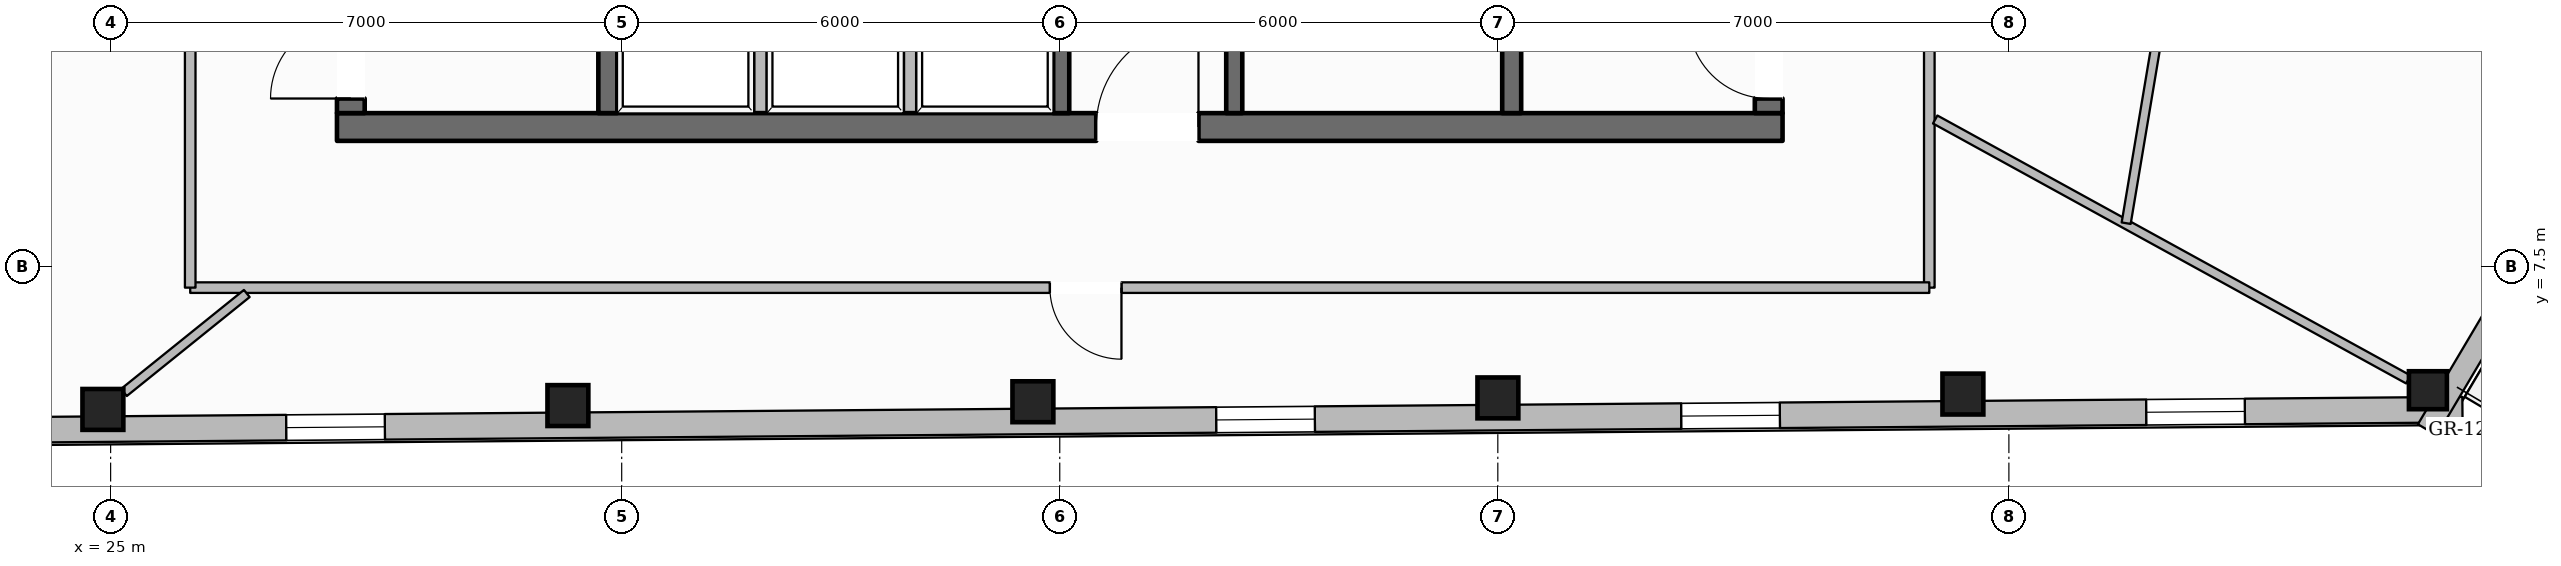
"""IFC4 building model, lengths in metres.
Left out: names, types, materials, properties, quantities, classifications, styles, units other than length and angle.
Written with IfcOpenShell. Run it as: python <this file> out.ifc"""

import sys

from ifc_helpers import new_model, si_unit, direction, frame, frame_2d, origin, origin_2d, place, context, subcontext, project, spatial, rectangle, hollow_rectangle, extrude, element, fill, save


model = new_model("IFC4")
c1 = context("Model", 3, precision=1e-05, world=origin(), true_north=direction((0.0, 1.0)))
c2 = subcontext(c1, "Body", "Model", "MODEL_VIEW")
j1 = project(units=[si_unit("LENGTHUNIT", "METRE"), si_unit("PLANEANGLEUNIT", "RADIAN")], contexts=[c1])
p1 = place(None, origin())
s1 = spatial("IfcSite", under=j1, at=p1, CompositionType="ELEMENT")
p2 = place(p1, origin())
s2 = spatial("IfcBuilding", under=s1, at=p2, CompositionType="ELEMENT")
p3 = place(p2, frame((0.0, 0.0, 281.85)))
s3 = spatial("IfcBuildingStorey", under=s2, at=p3, CompositionType="ELEMENT", Elevation=281.85)
p4 = place(p3, frame((28.1, 9.41, 0.0), z_axis=(0.0, 0.0, 1.0), x_axis=(1.0, 0.0, 0.0)))
e1 = element("IfcWall", 1, at=p4, inside=s3, PredefinedType="SOLIDWALL", context=c2, shape_type="SweptSolid", body=[
    extrude(rectangle(XDim=19.8, YDim=0.38, at=frame_2d((9.9, 0.0))), origin(), (0.0, 0.0, 1.0), 3.61),
])
p5 = place(p4, frame((10.4, 0.0, 0.0)))
e2 = element("IfcOpeningElement", 2, at=p5, cuts=e1, PredefinedType="OPENING", context=c2, shape_type="SweptSolid", body=[
    extrude(rectangle(XDim=1.4, YDim=2.2, at=frame_2d((0.7, 1.1))), frame((0.0, 0.2, 0.0), z_axis=(0.0, -1.0, 0.0), x_axis=(1.0, 0.0, 0.0)), (0.0, 0.0, 1.0), 0.4),
])
p6 = place(p3, frame((28.29, 9.6, 0.0), z_axis=(0.0, 0.0, 1.0), x_axis=(0.0, 1.0, 0.0)))
e3 = element("IfcWall", 3, at=p6, inside=s3, PredefinedType="SOLIDWALL", context=c2, shape_type="SweptSolid", body=[
    extrude(rectangle(XDim=13.0, YDim=0.38, at=frame_2d((6.5, 0.0))), origin(), (0.0, 0.0, 1.0), 3.61),
])
p7 = place(p6, frame((0.2, 0.0, 0.0)))
e4 = element("IfcOpeningElement", 4, at=p7, cuts=e3, PredefinedType="OPENING", context=c2, shape_type="SweptSolid", body=[
    extrude(rectangle(XDim=1.1, YDim=2.15, at=frame_2d((0.55, 1.075))), frame((0.0, 0.2, 0.0), z_axis=(0.0, -1.0, 0.0), x_axis=(1.0, 0.0, 0.0)), (0.0, 0.0, 1.0), 0.4),
])
p8 = place(p6, frame((8.4, 0.0, 0.0)))
e5 = element("IfcOpeningElement", 5, at=p8, cuts=e3, PredefinedType="OPENING", context=c2, shape_type="SweptSolid", body=[
    extrude(rectangle(XDim=0.9, YDim=2.1, at=frame_2d((0.45, 1.05))), frame((0.0, 0.2, 0.0), z_axis=(0.0, -1.0, 0.0), x_axis=(1.0, 0.0, 0.0)), (0.0, 0.0, 1.0), 0.4),
])
p9 = place(p3, frame((47.71, 9.6, 0.0), z_axis=(0.0, 0.0, 1.0), x_axis=(0.0, 1.0, 0.0)))
e6 = element("IfcWall", 6, at=p9, inside=s3, PredefinedType="SOLIDWALL", context=c2, shape_type="SweptSolid", body=[
    extrude(rectangle(XDim=13.0, YDim=0.38, at=frame_2d((6.5, 0.0))), origin(), (0.0, 0.0, 1.0), 3.61),
])
p10 = place(p9, frame((0.2, 0.0, 0.0)))
e7 = element("IfcOpeningElement", 7, at=p10, cuts=e6, PredefinedType="OPENING", context=c2, shape_type="SweptSolid", body=[
    extrude(rectangle(XDim=1.1, YDim=2.15, at=frame_2d((0.55, 1.075))), frame((0.0, 0.2, 0.0), z_axis=(0.0, -1.0, 0.0), x_axis=(1.0, 0.0, 0.0)), (0.0, 0.0, 1.0), 0.4),
])
p11 = place(p9, frame((8.4, 0.0, 0.0)))
e8 = element("IfcOpeningElement", 8, at=p11, cuts=e6, PredefinedType="OPENING", context=c2, shape_type="SweptSolid", body=[
    extrude(rectangle(XDim=0.9, YDim=2.1, at=frame_2d((0.45, 1.05))), frame((0.0, 0.2, 0.0), z_axis=(0.0, -1.0, 0.0), x_axis=(1.0, 0.0, 0.0)), (0.0, 0.0, 1.0), 0.4),
])
p12 = place(p3, frame((31.81, 9.6, 0.0), z_axis=(0.0, 0.0, 1.0), x_axis=(0.0, 1.0, 0.0)))
e9 = element("IfcWall", 9, at=p12, inside=s3, PredefinedType="SHEAR", context=c2, shape_type="SweptSolid", body=[
    extrude(rectangle(XDim=13.0, YDim=0.26, at=frame_2d((6.5, 0.0))), origin(), (0.0, 0.0, 1.0), 3.61),
])
p13 = place(p12, frame((10.925, 0.0, 0.0)))
e10 = element("IfcOpeningElement", 10, at=p13, cuts=e9, PredefinedType="OPENING", context=c2, shape_type="SweptSolid", body=[
    extrude(rectangle(XDim=1.25, YDim=2.25, at=frame_2d((0.625, 1.125))), frame((0.0, 0.14, 0.0), z_axis=(0.0, -1.0, 0.0), x_axis=(1.0, 0.0, 0.0)), (0.0, 0.0, 1.0), 0.28),
])
p14 = place(p3, frame((44.19, 9.6, 0.0), z_axis=(0.0, 0.0, 1.0), x_axis=(0.0, 1.0, 0.0)))
e11 = element("IfcWall", 11, at=p14, inside=s3, PredefinedType="SHEAR", context=c2, shape_type="SweptSolid", body=[
    extrude(rectangle(XDim=13.0, YDim=0.26, at=frame_2d((6.5, 0.0))), origin(), (0.0, 0.0, 1.0), 3.61),
])
p15 = place(p14, frame((10.925, 0.0, 0.0)))
e12 = element("IfcOpeningElement", 12, at=p15, cuts=e11, PredefinedType="OPENING", context=c2, shape_type="SweptSolid", body=[
    extrude(rectangle(XDim=1.25, YDim=2.25, at=frame_2d((0.625, 1.125))), frame((0.0, 0.14, 0.0), z_axis=(0.0, -1.0, 0.0), x_axis=(1.0, 0.0, 0.0)), (0.0, 0.0, 1.0), 0.28),
])
for number, where, z_axis, x_axis in (
    (13, (38.02, 9.6, 0.0), (0.0, 0.0, 1.0), (0.0, 1.0, 0.0)),
    (14, (40.39, 9.6, 0.0), (0.0, 0.0, 1.0), (0.0, 1.0, 0.0)),
):
    element("IfcWall", number, at=place(p3, frame(where, z_axis=z_axis, x_axis=x_axis)), inside=s3, PredefinedType="SOLIDWALL", context=c2, shape_type="SweptSolid", body=[
        extrude(rectangle(XDim=2.24, YDim=0.22, at=frame_2d((1.12, 0.0))), origin(), (0.0, 0.0, 1.0), 3.61),
    ])
for number, where, z_axis, x_axis in (
    (15, (24.894, 5.542, 0.0), (0.0, 0.0, 1.0), (1.0, 0.0, 0.0)),
    (16, (31.263, 5.594, 0.0), (0.0, 0.0, 1.0), (1.0, 0.0, 0.0)),
    (17, (37.632, 5.647, 0.0), (0.0, 0.0, 1.0), (1.0, 0.0, 0.0)),
    (18, (44.001, 5.7, 0.0), (0.0, 0.0, 1.0), (1.0, 0.0, 0.0)),
    (19, (50.37, 5.752, 0.0), (0.0, 0.0, 1.0), (1.0, 0.0, 0.0)),
):
    element("IfcColumn", number, at=place(p3, frame(where, z_axis=z_axis, x_axis=x_axis)), inside=s3, PredefinedType="COLUMN", context=c2, shape_type="SweptSolid", body=[
        extrude(hollow_rectangle(XDim=0.56, YDim=0.56, WallThickness=0.025, at=origin_2d()), origin(), (0.0, 0.0, 1.0), 3.61),
    ])
p16 = place(p3, frame((56.739, 5.805, 0.0), z_axis=(0.0, 0.0, 1.0), x_axis=(1.0, 0.0, 0.0)))
e20 = element("IfcColumn", 20, at=p16, inside=s3, PredefinedType="COLUMN", context=c2, shape_type="SweptSolid", body=[
    extrude(hollow_rectangle(XDim=0.52, YDim=0.52, WallThickness=0.024, at=origin_2d()), origin(), (0.0, 0.0, 1.0), 3.61),
])
p17 = place(p3, frame((15.219, 10.076, 0.0), z_axis=(0.0, 0.0, 1.0), x_axis=(0.509799642177, 0.860293162147, 0.0)))
e21 = element("IfcWall", 21, at=p17, inside=s3, PredefinedType="STANDARD", context=c2, shape_type="SweptSolid", body=[
    extrude(rectangle(XDim=38.963, YDim=0.35, at=frame_2d((19.481, 0.0))), origin(), (0.0, 0.0, 1.0), 3.196),
])
p18 = place(p17, frame((34.65, 0.0, 0.65)))
e22 = element("IfcOpeningElement", 22, at=p18, cuts=e21, PredefinedType="OPENING", context=c2, shape_type="SweptSolid", body=[
    extrude(rectangle(XDim=1.35, YDim=1.75, at=frame_2d((0.675, 0.875))), frame((0.0, 0.185, 0.0), z_axis=(0.0, -1.0, 0.0), x_axis=(1.0, 0.0, 0.0)), (0.0, 0.0, 1.0), 0.37),
])
p19 = place(p17, frame((28.314, 0.0, 0.65)))
e23 = element("IfcOpeningElement", 23, at=p19, cuts=e21, PredefinedType="OPENING", context=c2, shape_type="SweptSolid", body=[
    extrude(rectangle(XDim=1.35, YDim=1.75, at=frame_2d((0.675, 0.875))), frame((0.0, 0.185, 0.0), z_axis=(0.0, -1.0, 0.0), x_axis=(1.0, 0.0, 0.0)), (0.0, 0.0, 1.0), 0.37),
])
p20 = place(p17, frame((15.645, 0.0, 0.65)))
e24 = element("IfcOpeningElement", 24, at=p20, cuts=e21, PredefinedType="OPENING", context=c2, shape_type="SweptSolid", body=[
    extrude(rectangle(XDim=1.35, YDim=1.75, at=frame_2d((0.675, 0.875))), frame((0.0, 0.185, 0.0), z_axis=(0.0, -1.0, 0.0), x_axis=(1.0, 0.0, 0.0)), (0.0, 0.0, 1.0), 0.37),
])
p21 = place(p17, frame((9.309, 0.0, 0.65)))
e25 = element("IfcOpeningElement", 25, at=p21, cuts=e21, PredefinedType="OPENING", context=c2, shape_type="SweptSolid", body=[
    extrude(rectangle(XDim=1.35, YDim=1.75, at=frame_2d((0.675, 0.875))), frame((0.0, 0.185, 0.0), z_axis=(0.0, -1.0, 0.0), x_axis=(1.0, 0.0, 0.0)), (0.0, 0.0, 1.0), 0.37),
])
p22 = place(p17, frame((2.974, 0.0, 0.65)))
e26 = element("IfcOpeningElement", 26, at=p22, cuts=e21, PredefinedType="OPENING", context=c2, shape_type="SweptSolid", body=[
    extrude(rectangle(XDim=1.35, YDim=1.75, at=frame_2d((0.675, 0.875))), frame((0.0, 0.185, 0.0), z_axis=(0.0, -1.0, 0.0), x_axis=(1.0, 0.0, 0.0)), (0.0, 0.0, 1.0), 0.37),
])
p23 = place(p3, frame((57.212, 5.539, 0.0), z_axis=(0.0, 0.0, 1.0), x_axis=(-0.999965837877, -0.008265777521, 0.0)))
e27 = element("IfcWall", 27, at=p23, inside=s3, PredefinedType="STANDARD", context=c2, shape_type="SweptSolid", body=[
    extrude(rectangle(XDim=39.165, YDim=0.35, at=frame_2d((19.583, 0.0))), origin(), (0.0, 0.0, 1.0), 3.196),
])
p24 = place(p23, frame((34.827, 0.0, 0.65)))
e28 = element("IfcOpeningElement", 28, at=p24, cuts=e27, PredefinedType="OPENING", context=c2, shape_type="SweptSolid", body=[
    extrude(rectangle(XDim=1.35, YDim=1.75, at=frame_2d((0.675, 0.875))), frame((0.0, 0.185, 0.0), z_axis=(0.0, -1.0, 0.0), x_axis=(1.0, 0.0, 0.0)), (0.0, 0.0, 1.0), 0.37),
])
p25 = place(p23, frame((28.458, 0.0, 0.65)))
e29 = element("IfcOpeningElement", 29, at=p25, cuts=e27, PredefinedType="OPENING", context=c2, shape_type="SweptSolid", body=[
    extrude(rectangle(XDim=1.35, YDim=1.75, at=frame_2d((0.675, 0.875))), frame((0.0, 0.185, 0.0), z_axis=(0.0, -1.0, 0.0), x_axis=(1.0, 0.0, 0.0)), (0.0, 0.0, 1.0), 0.37),
])
p26 = place(p23, frame((15.719, 0.0, 0.65)))
e30 = element("IfcOpeningElement", 30, at=p26, cuts=e27, PredefinedType="OPENING", context=c2, shape_type="SweptSolid", body=[
    extrude(rectangle(XDim=1.35, YDim=1.75, at=frame_2d((0.675, 0.875))), frame((0.0, 0.185, 0.0), z_axis=(0.0, -1.0, 0.0), x_axis=(1.0, 0.0, 0.0)), (0.0, 0.0, 1.0), 0.37),
])
p27 = place(p23, frame((9.35, 0.0, 0.65)))
e31 = element("IfcOpeningElement", 31, at=p27, cuts=e27, PredefinedType="OPENING", context=c2, shape_type="SweptSolid", body=[
    extrude(rectangle(XDim=1.35, YDim=1.75, at=frame_2d((0.675, 0.875))), frame((0.0, 0.185, 0.0), z_axis=(0.0, -1.0, 0.0), x_axis=(1.0, 0.0, 0.0)), (0.0, 0.0, 1.0), 0.37),
])
p28 = place(p23, frame((2.98, 0.0, 0.65)))
e32 = element("IfcOpeningElement", 32, at=p28, cuts=e27, PredefinedType="OPENING", context=c2, shape_type="SweptSolid", body=[
    extrude(rectangle(XDim=1.35, YDim=1.75, at=frame_2d((0.675, 0.875))), frame((0.0, 0.185, 0.0), z_axis=(0.0, -1.0, 0.0), x_axis=(1.0, 0.0, 0.0)), (0.0, 0.0, 1.0), 0.37),
])
p29 = place(p3, frame((60.135, 11.006, 0.0), z_axis=(0.0, 0.0, 1.0), x_axis=(-0.509788358207, -0.860299848795, 0.0)))
e33 = element("IfcWall", 33, at=p29, inside=s3, PredefinedType="STANDARD", context=c2, shape_type="SweptSolid", body=[
    extrude(rectangle(XDim=6.677, YDim=0.3, at=frame_2d((3.338, 0.0))), origin(), (0.0, 0.0, 1.0), 3.196),
])
p30 = place(p29, frame((2.763, 0.0, 0.0)))
e34 = element("IfcOpeningElement", 34, at=p30, cuts=e33, PredefinedType="OPENING", context=c2, shape_type="SweptSolid", body=[
    extrude(rectangle(XDim=1.15, YDim=2.2, at=frame_2d((0.575, 1.1))), frame((0.0, 0.16, 0.0), z_axis=(0.0, -1.0, 0.0), x_axis=(1.0, 0.0, 0.0)), (0.0, 0.0, 1.0), 0.32),
])
p31 = place(p3, frame((40.827, 43.65, 0.0), z_axis=(0.0, 0.0, 1.0), x_axis=(0.502670175865, -0.864478278672, 0.0)))
e35 = element("IfcWall", 35, at=p31, inside=s3, PredefinedType="STANDARD", context=c2, shape_type="SweptSolid", body=[
    extrude(rectangle(XDim=38.406, YDim=0.35, at=frame_2d((19.203, 0.0))), origin(), (0.0, 0.0, 1.0), 3.196),
])
p32 = place(p31, frame((34.128, 0.0, 0.65)))
e36 = element("IfcOpeningElement", 36, at=p32, cuts=e35, PredefinedType="OPENING", context=c2, shape_type="SweptSolid", body=[
    extrude(rectangle(XDim=1.35, YDim=1.75, at=frame_2d((0.675, 0.875))), frame((0.0, 0.185, 0.0), z_axis=(0.0, -1.0, 0.0), x_axis=(1.0, 0.0, 0.0)), (0.0, 0.0, 1.0), 0.37),
])
p33 = place(p31, frame((27.888, 0.0, 0.65)))
e37 = element("IfcOpeningElement", 37, at=p33, cuts=e35, PredefinedType="OPENING", context=c2, shape_type="SweptSolid", body=[
    extrude(rectangle(XDim=1.35, YDim=1.75, at=frame_2d((0.675, 0.875))), frame((0.0, 0.185, 0.0), z_axis=(0.0, -1.0, 0.0), x_axis=(1.0, 0.0, 0.0)), (0.0, 0.0, 1.0), 0.37),
])
p34 = place(p31, frame((15.406, 0.0, 0.65)))
e38 = element("IfcOpeningElement", 38, at=p34, cuts=e35, PredefinedType="OPENING", context=c2, shape_type="SweptSolid", body=[
    extrude(rectangle(XDim=1.35, YDim=1.75, at=frame_2d((0.675, 0.875))), frame((0.0, 0.185, 0.0), z_axis=(0.0, -1.0, 0.0), x_axis=(1.0, 0.0, 0.0)), (0.0, 0.0, 1.0), 0.37),
])
p35 = place(p31, frame((9.165, 0.0, 0.65)))
e39 = element("IfcOpeningElement", 39, at=p35, cuts=e35, PredefinedType="OPENING", context=c2, shape_type="SweptSolid", body=[
    extrude(rectangle(XDim=1.35, YDim=1.75, at=frame_2d((0.675, 0.875))), frame((0.0, 0.185, 0.0), z_axis=(0.0, -1.0, 0.0), x_axis=(1.0, 0.0, 0.0)), (0.0, 0.0, 1.0), 0.37),
])
p36 = place(p31, frame((2.924, 0.0, 0.65)))
e40 = element("IfcOpeningElement", 40, at=p36, cuts=e35, PredefinedType="OPENING", context=c2, shape_type="SweptSolid", body=[
    extrude(rectangle(XDim=1.35, YDim=1.75, at=frame_2d((0.675, 0.875))), frame((0.0, 0.185, 0.0), z_axis=(0.0, -1.0, 0.0), x_axis=(1.0, 0.0, 0.0)), (0.0, 0.0, 1.0), 0.37),
])
for number, where, z_axis, x_axis in (
    (41, (33.9, 9.49, 0.0), (0.0, 0.0, 1.0), (0.0, 1.0, 0.0)),
    (42, (35.95, 9.49, 0.0), (0.0, 0.0, 1.0), (0.0, 1.0, 0.0)),
):
    element("IfcWall", number, at=place(p3, frame(where, z_axis=z_axis, x_axis=x_axis)), inside=s3, PredefinedType="PARTITIONING", context=c2, shape_type="SweptSolid", body=[
        extrude(rectangle(XDim=2.35, YDim=0.165, at=frame_2d((1.175, 0.0))), origin(), (0.0, 0.0, 1.0), 3.61),
    ])
p37 = place(p3, frame((49.91, 12.15, 0.0), z_axis=(0.0, 0.0, 1.0), x_axis=(0.0, -1.0, 0.0)))
e43 = element("IfcWall", 43, at=p37, inside=s3, PredefinedType="PARTITIONING", context=c2, shape_type="SweptSolid", body=[
    extrude(rectangle(XDim=4.94, YDim=0.145, at=frame_2d((2.47, 0.0))), origin(), (0.0, 0.0, 1.0), 3.61),
])
p38 = place(p3, frame((49.91, 7.21, 0.0), z_axis=(0.0, 0.0, 1.0), x_axis=(-1.0, 0.0, 0.0)))
e44 = element("IfcWall", 44, at=p38, inside=s3, PredefinedType="PARTITIONING", context=c2, shape_type="SweptSolid", body=[
    extrude(rectangle(XDim=23.82, YDim=0.145, at=frame_2d((11.91, 0.0))), origin(), (0.0, 0.0, 1.0), 3.61),
])
p39 = place(p38, frame((11.065, 0.0, 0.0)))
e45 = element("IfcOpeningElement", 45, at=p39, cuts=e44, PredefinedType="OPENING", context=c2, shape_type="SweptSolid", body=[
    extrude(rectangle(XDim=0.98, YDim=2.15, at=frame_2d((0.49, 1.075))), frame((0.0, 0.083, 0.0), z_axis=(0.0, -1.0, 0.0), x_axis=(1.0, 0.0, 0.0)), (0.0, 0.0, 1.0), 0.165),
])
p40 = place(p3, frame((26.09, 7.21, 0.0), z_axis=(0.0, 0.0, 1.0), x_axis=(0.0, 1.0, 0.0)))
e46 = element("IfcWall", 46, at=p40, inside=s3, PredefinedType="PARTITIONING", context=c2, shape_type="SweptSolid", body=[
    extrude(rectangle(XDim=17.78, YDim=0.145, at=frame_2d((8.89, 0.0))), origin(), (0.0, 0.0, 1.0), 3.349),
])
p41 = place(p40, frame((5.989, 0.0, 0.0)))
e47 = element("IfcOpeningElement", 47, at=p41, cuts=e46, PredefinedType="OPENING", context=c2, shape_type="SweptSolid", body=[
    extrude(rectangle(XDim=0.98, YDim=2.15, at=frame_2d((0.49, 1.075))), frame((0.0, 0.083, 0.0), z_axis=(0.0, -1.0, 0.0), x_axis=(1.0, 0.0, 0.0)), (0.0, 0.0, 1.0), 0.165),
])
p42 = place(p3, frame((26.865, 7.129, 0.0), z_axis=(0.0, 0.0, 1.0), x_axis=(-0.778737044486, -0.627350472658, 0.0)))
e48 = element("IfcWall", 48, at=p42, inside=s3, PredefinedType="PARTITIONING", context=c2, shape_type="SweptSolid", body=[
    extrude(rectangle(XDim=2.161, YDim=0.125, at=frame_2d((1.081, 0.0))), origin(), (0.0, 0.0, 1.0), 3.246),
])
p43 = place(p3, frame((49.99, 9.513, 0.0), z_axis=(0.0, 0.0, 1.0), x_axis=(0.876449336432, -0.481494092039, 0.0)))
e49 = element("IfcWall", 49, at=p43, inside=s3, PredefinedType="PARTITIONING", context=c2, shape_type="SweptSolid", body=[
    extrude(rectangle(XDim=7.394, YDim=0.125, at=frame_2d((3.697, 0.0))), origin(), (0.0, 0.0, 1.0), 3.246),
])
p44 = place(p3, frame((52.606, 8.093, 0.0), z_axis=(0.0, 0.0, 1.0), x_axis=(0.165341157719, 0.986236432892, 0.0)))
e50 = element("IfcWall", 50, at=p44, inside=s3, PredefinedType="PARTITIONING", context=c2, shape_type="SweptSolid", body=[
    extrude(rectangle(XDim=11.807, YDim=0.125, at=frame_2d((5.903, 0.0))), origin(), (0.0, 0.0, 1.0), 3.349),
])
p45 = place(p44, frame((5.523, 0.0, 0.0)))
e51 = element("IfcOpeningElement", 51, at=p45, cuts=e50, PredefinedType="OPENING", context=c2, shape_type="SweptSolid", body=[
    extrude(rectangle(XDim=0.98, YDim=2.15, at=frame_2d((0.49, 1.075))), frame((0.0, 0.073, 0.0), z_axis=(0.0, -1.0, 0.0), x_axis=(1.0, 0.0, 0.0)), (0.0, 0.0, 1.0), 0.145),
])
p46 = place(p25, origin())
e52 = element("IfcWindow", 52, at=p46, inside=s3, PartitioningType="SINGLE_PANEL", PredefinedType="WINDOW", context=c2, shape_type="SweptSolid", body=[
    extrude(rectangle(XDim=1.35, YDim=1.75, at=frame_2d((0.675, 0.875))), frame((0.0, 0.03, 0.0), z_axis=(0.0, -1.0, 0.0), x_axis=(1.0, 0.0, 0.0)), (0.0, 0.0, 1.0), 0.06),
])
fill(e29, e52)
p47 = place(p26, origin())
e53 = element("IfcWindow", 53, at=p47, inside=s3, PartitioningType="SINGLE_PANEL", PredefinedType="WINDOW", context=c2, shape_type="SweptSolid", body=[
    extrude(rectangle(XDim=1.35, YDim=1.75, at=frame_2d((0.675, 0.875))), frame((0.0, 0.03, 0.0), z_axis=(0.0, -1.0, 0.0), x_axis=(1.0, 0.0, 0.0)), (0.0, 0.0, 1.0), 0.06),
])
fill(e30, e53)
p48 = place(p27, origin())
e54 = element("IfcWindow", 54, at=p48, inside=s3, PartitioningType="SINGLE_PANEL", PredefinedType="WINDOW", context=c2, shape_type="SweptSolid", body=[
    extrude(rectangle(XDim=1.35, YDim=1.75, at=frame_2d((0.675, 0.875))), frame((0.0, 0.03, 0.0), z_axis=(0.0, -1.0, 0.0), x_axis=(1.0, 0.0, 0.0)), (0.0, 0.0, 1.0), 0.06),
])
fill(e31, e54)
p49 = place(p28, origin())
e55 = element("IfcWindow", 55, at=p49, inside=s3, PartitioningType="SINGLE_PANEL", PredefinedType="WINDOW", context=c2, shape_type="SweptSolid", body=[
    extrude(rectangle(XDim=1.35, YDim=1.75, at=frame_2d((0.675, 0.875))), frame((0.0, 0.03, 0.0), z_axis=(0.0, -1.0, 0.0), x_axis=(1.0, 0.0, 0.0)), (0.0, 0.0, 1.0), 0.06),
])
fill(e32, e55)
p50 = place(p7, origin())
e56 = element("IfcDoor", 56, at=p50, inside=s3, OperationType="SINGLE_SWING_LEFT", PredefinedType="DOOR", context=c2, shape_type="SweptSolid", body=[
    extrude(rectangle(XDim=1.1, YDim=2.15, at=frame_2d((0.55, 1.075))), frame((0.0, 0.025, 0.0), z_axis=(0.0, -1.0, 0.0), x_axis=(1.0, 0.0, 0.0)), (0.0, 0.0, 1.0), 0.05),
])
fill(e4, e56)
p51 = place(p10, origin())
e57 = element("IfcDoor", 57, at=p51, inside=s3, OperationType="SINGLE_SWING_RIGHT", PredefinedType="DOOR", context=c2, shape_type="SweptSolid", body=[
    extrude(rectangle(XDim=1.1, YDim=2.15, at=frame_2d((0.55, 1.075))), frame((0.0, 0.025, 0.0), z_axis=(0.0, -1.0, 0.0), x_axis=(1.0, 0.0, 0.0)), (0.0, 0.0, 1.0), 0.05),
])
fill(e7, e57)
p52 = place(p5, origin())
e58 = element("IfcDoor", 58, at=p52, inside=s3, OperationType="SINGLE_SWING_RIGHT", PredefinedType="DOOR", context=c2, shape_type="SweptSolid", body=[
    extrude(rectangle(XDim=1.4, YDim=2.2, at=frame_2d((0.7, 1.1))), frame((0.0, 0.025, 0.0), z_axis=(0.0, -1.0, 0.0), x_axis=(1.0, 0.0, 0.0)), (0.0, 0.0, 1.0), 0.05),
])
fill(e2, e58)
p53 = place(p39, origin())
e59 = element("IfcDoor", 59, at=p53, inside=s3, OperationType="SINGLE_SWING_LEFT", PredefinedType="DOOR", context=c2, shape_type="SweptSolid", body=[
    extrude(rectangle(XDim=0.98, YDim=2.15, at=frame_2d((0.49, 1.075))), frame((0.0, 0.025, 0.0), z_axis=(0.0, -1.0, 0.0), x_axis=(1.0, 0.0, 0.0)), (0.0, 0.0, 1.0), 0.05),
])
fill(e45, e59)
save(model, sys.argv[1])
